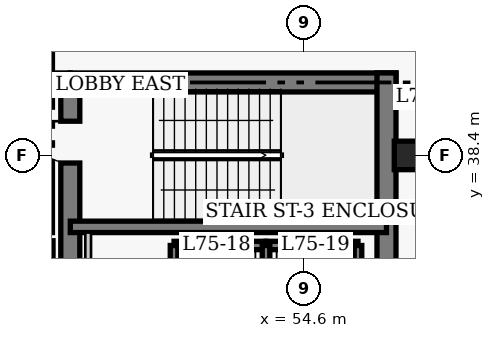
"""IFC4 building model, lengths in metres.
Left out: names, types, materials, properties, quantities, classifications, styles, units other than length and angle.
Written with IfcOpenShell. Run it as: python <this file> out.ifc"""

import sys

from ifc_helpers import new_model, si_unit, direction, frame, frame_2d, origin, origin_2d, place, context, subcontext, project, spatial, rectangle, extrude, element, fill, save


model = new_model("IFC4")
c1 = context("Model", 3, precision=1e-05, world=origin(), true_north=direction((0.0, 1.0)))
c2 = subcontext(c1, "Body", "Model", "MODEL_VIEW")
j1 = project(units=[si_unit("LENGTHUNIT", "METRE"), si_unit("PLANEANGLEUNIT", "RADIAN")], contexts=[c1])
p1 = place(None, origin())
s1 = spatial("IfcSite", under=j1, at=p1, CompositionType="ELEMENT")
p2 = place(p1, origin())
s2 = spatial("IfcBuilding", under=s1, at=p2, CompositionType="ELEMENT")
p3 = place(p2, frame((0.0, 0.0, 302.0)))
s3 = spatial("IfcBuildingStorey", under=s2, at=p3, CompositionType="ELEMENT", Elevation=302.0)
p4 = place(p3, frame((35.85, 40.32, 0.0), z_axis=(0.0, 0.0, 1.0), x_axis=(1.0, 0.0, 0.0)))
e1 = element("IfcWall", 1, at=p4, inside=s3, PredefinedType="SHEAR", context=c2, shape_type="SweptSolid", body=[
    extrude(rectangle(XDim=12.6, YDim=0.5, at=frame_2d((6.3, 0.0))), origin(), (0.0, 0.0, 1.0), 4.6),
])
p5 = place(p3, frame((48.45, 40.32, 0.0), z_axis=(0.0, 0.0, 1.0), x_axis=(1.0, 0.0, 0.0)))
e2 = element("IfcWall", 2, at=p5, inside=s3, PredefinedType="SHEAR", context=c2, shape_type="SweptSolid", body=[
    extrude(rectangle(XDim=8.57, YDim=0.5, at=frame_2d((4.285, 0.0))), origin(), (0.0, 0.0, 1.0), 4.6),
])
p6 = place(p3, frame((56.77, 27.05, 0.0), z_axis=(0.0, 0.0, 1.0), x_axis=(0.0, 1.0, 0.0)))
e3 = element("IfcWall", 3, at=p6, inside=s3, PredefinedType="SHEAR", context=c2, shape_type="SweptSolid", body=[
    extrude(rectangle(XDim=13.52, YDim=0.5, at=frame_2d((6.76, 0.0))), origin(), (0.0, 0.0, 1.0), 4.6),
])
p7 = place(p3, frame((48.45, 32.5, 0.0), z_axis=(0.0, 0.0, 1.0), x_axis=(0.0, 1.0, 0.0)))
e4 = element("IfcWall", 4, at=p7, inside=s3, PredefinedType="SHEAR", context=c2, shape_type="SweptSolid", body=[
    extrude(rectangle(XDim=7.82, YDim=0.5, at=frame_2d((3.91, 0.0))), origin(), (0.0, 0.0, 1.0), 4.6),
])
p8 = place(p7, frame((5.7, 0.0, 0.0)))
e5 = element("IfcOpeningElement", 5, at=p8, cuts=e4, PredefinedType="OPENING", context=c2, shape_type="SweptSolid", body=[
    extrude(rectangle(XDim=1.1, YDim=2.15, at=frame_2d((0.55, 1.075))), frame((0.0, 0.26, 0.0), z_axis=(0.0, -1.0, 0.0), x_axis=(1.0, 0.0, 0.0)), (0.0, 0.0, 1.0), 0.52),
])
p9 = place(p3, frame((48.45, 36.52, 0.0), z_axis=(0.0, 0.0, 1.0), x_axis=(1.0, 0.0, 0.0)))
e6 = element("IfcWall", 6, at=p9, inside=s3, PredefinedType="SHEAR", context=c2, shape_type="SweptSolid", body=[
    extrude(rectangle(XDim=8.32, YDim=0.3, at=frame_2d((4.16, 0.0))), origin(), (0.0, 0.0, 1.0), 4.6),
])
p10 = place(p3, frame((57.35, 38.4, 0.0), z_axis=(0.0, 0.0, 1.0), x_axis=(1.0, 0.0, 0.0)))
e7 = element("IfcColumn", 7, at=p10, inside=s3, PredefinedType="COLUMN", context=c2, shape_type="SweptSolid", body=[
    extrude(rectangle(XDim=0.75, YDim=0.75, at=origin_2d()), origin(), (0.0, 0.0, 1.0), 4.6),
])
p11 = place(p3, frame((51.18, 36.03, 0.0), z_axis=(0.0, 0.0, 1.0), x_axis=(1.0, 0.0, 0.0)))
e8 = element("IfcWall", 8, at=p11, inside=s3, PredefinedType="SHEAR", context=c2, shape_type="SweptSolid", body=[
    extrude(rectangle(XDim=2.42, YDim=0.22, at=frame_2d((1.21, 0.0))), origin(), (0.0, 0.0, 1.0), 4.6),
])
p12 = place(p3, frame((51.18, 33.17, 0.0), z_axis=(0.0, 0.0, 1.0), x_axis=(0.0, 1.0, 0.0)))
e9 = element("IfcWall", 9, at=p12, inside=s3, PredefinedType="SHEAR", context=c2, shape_type="SweptSolid", body=[
    extrude(rectangle(XDim=2.86, YDim=0.2, at=frame_2d((1.43, 0.0))), origin(), (0.0, 0.0, 1.0), 4.6),
])
p13 = place(p3, frame((53.6, 36.03, 0.0), z_axis=(0.0, 0.0, 1.0), x_axis=(1.0, 0.0, 0.0)))
e10 = element("IfcWall", 10, at=p13, inside=s3, PredefinedType="SHEAR", context=c2, shape_type="SweptSolid", body=[
    extrude(rectangle(XDim=2.42, YDim=0.22, at=frame_2d((1.21, 0.0))), origin(), (0.0, 0.0, 1.0), 4.6),
])
for number, where, z_axis, x_axis in (
    (11, (53.6, 33.17, 0.0), (0.0, 0.0, 1.0), (0.0, 1.0, 0.0)),
    (12, (56.02, 33.17, 0.0), (0.0, 0.0, 1.0), (0.0, 1.0, 0.0)),
):
    element("IfcWall", number, at=place(p3, frame(where, z_axis=z_axis, x_axis=x_axis)), inside=s3, PredefinedType="SHEAR", context=c2, shape_type="SweptSolid", body=[
        extrude(rectangle(XDim=2.86, YDim=0.2, at=frame_2d((1.43, 0.0))), origin(), (0.0, 0.0, 1.0), 4.6),
    ])
p14 = place(p3, frame((47.895, 33.245, 0.0), z_axis=(0.0, 0.0, 1.0), x_axis=(0.0, 1.0, 0.0)))
e13 = element("IfcWall", 13, at=p14, inside=s3, PredefinedType="SHEAR", context=c2, shape_type="SweptSolid", body=[
    extrude(rectangle(XDim=2.91, YDim=0.2, at=frame_2d((1.455, 0.0))), origin(), (0.0, 0.0, 1.0), 4.6),
])
p15 = place(p3, frame((48.92, 32.75, 0.0), z_axis=(0.0, 0.0, 1.0), x_axis=(0.0, 1.0, 0.0)))
e14 = element("IfcWall", 14, at=p15, inside=s3, PredefinedType="PARTITIONING", context=c2, shape_type="SweptSolid", body=[
    extrude(rectangle(XDim=3.62, YDim=0.15, at=frame_2d((1.81, 0.0))), origin(), (0.0, 0.0, 1.0), 4.31),
])
p16 = place(p8, origin())
e15 = element("IfcDoor", 15, at=p16, inside=s3, OperationType="SINGLE_SWING_RIGHT", PredefinedType="DOOR", context=c2, shape_type="SweptSolid", body=[
    extrude(rectangle(XDim=1.1, YDim=2.15, at=frame_2d((0.55, 1.075))), frame((0.0, 0.025, 0.0), z_axis=(0.0, -1.0, 0.0), x_axis=(1.0, 0.0, 0.0)), (0.0, 0.0, 1.0), 0.05),
])
fill(e5, e15)
save(model, sys.argv[1])
